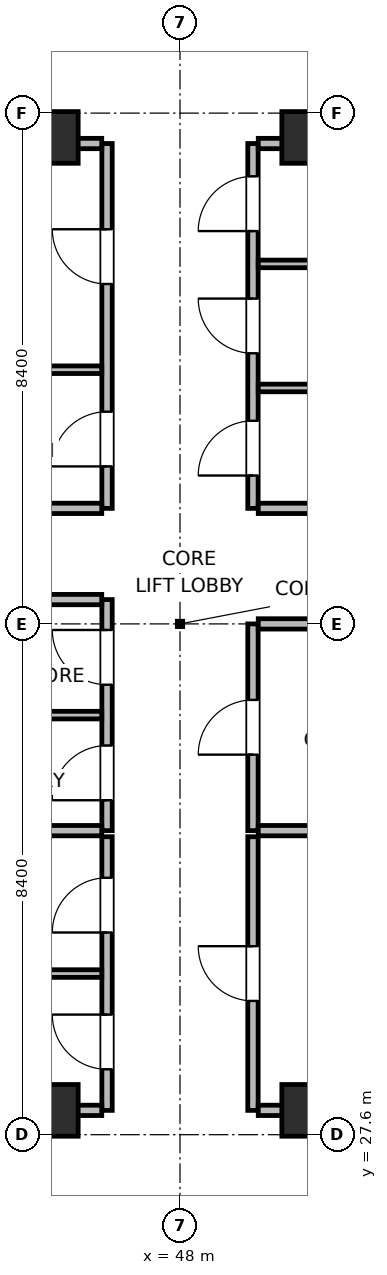
"""IFC4 building model, lengths in metres.
Left out: names, types, materials, properties, quantities, classifications, styles, units other than length and angle.
Written with IfcOpenShell. Run it as: python <this file> out.ifc"""

import sys

from ifc_helpers import new_model, si_unit, direction, frame, frame_2d, origin, origin_2d, place, context, subcontext, project, spatial, rectangle, extrude, element, fill, save


model = new_model("IFC4")
c1 = context("Model", 3, precision=1e-05, world=origin(), true_north=direction((0.0, 1.0)))
c2 = subcontext(c1, "Body", "Model", "MODEL_VIEW")
j1 = project(units=[si_unit("LENGTHUNIT", "METRE"), si_unit("PLANEANGLEUNIT", "RADIAN")], contexts=[c1])
p1 = place(None, origin())
s1 = spatial("IfcSite", under=j1, at=p1, CompositionType="ELEMENT")
p2 = place(p1, origin())
s2 = spatial("IfcBuilding", under=s1, at=p2, CompositionType="ELEMENT")
p3 = place(p2, frame((0.0, 0.0, 247.2)))
s3 = spatial("IfcBuildingStorey", under=s2, at=p3, CompositionType="ELEMENT", Elevation=247.2)
for number, where, z_axis, x_axis in (
    (1, (45.9, 28.0, 0.0), (0.0, 0.0, 1.0), (1.0, 0.0, 0.0)),
    (2, (50.1, 28.0, 0.0), (0.0, 0.0, 1.0), (1.0, 0.0, 0.0)),
    (3, (45.9, 44.0, 0.0), (0.0, 0.0, 1.0), (1.0, 0.0, 0.0)),
    (4, (50.1, 44.0, 0.0), (0.0, 0.0, 1.0), (1.0, 0.0, 0.0)),
):
    element("IfcColumn", number, at=place(p3, frame(where, z_axis=z_axis, x_axis=x_axis)), inside=s3, PredefinedType="COLUMN", context=c2, shape_type="SweptSolid", body=[
        extrude(rectangle(XDim=0.85, YDim=0.85, at=origin_2d()), origin(), (0.0, 0.0, 1.0), 3.9),
    ])
p4 = place(p3, frame((46.8, 32.6, 0.0), z_axis=(0.0, 0.0, 1.0), x_axis=(0.0, 1.0, 0.0)))
e5 = element("IfcWall", 5, at=p4, inside=s3, PredefinedType="PARTITIONING", context=c2, shape_type="SweptSolid", body=[
    extrude(rectangle(XDim=3.8, YDim=0.17, at=frame_2d((1.9, 0.0))), origin(), (0.0, 0.0, 1.0), 3.68),
])
p5 = place(p4, frame((0.5, 0.0, 0.0)))
e6 = element("IfcOpeningElement", 6, at=p5, cuts=e5, PredefinedType="OPENING", context=c2, shape_type="SweptSolid", body=[
    extrude(rectangle(XDim=0.9, YDim=2.02, at=frame_2d((0.45, 1.01))), frame((0.0, 0.095, 0.0), z_axis=(0.0, -1.0, 0.0), x_axis=(1.0, 0.0, 0.0)), (0.0, 0.0, 1.0), 0.19),
])
p6 = place(p4, frame((2.4, 0.0, 0.0)))
e7 = element("IfcOpeningElement", 7, at=p6, cuts=e5, PredefinedType="OPENING", context=c2, shape_type="SweptSolid", body=[
    extrude(rectangle(XDim=0.9, YDim=2.02, at=frame_2d((0.45, 1.01))), frame((0.0, 0.095, 0.0), z_axis=(0.0, -1.0, 0.0), x_axis=(1.0, 0.0, 0.0)), (0.0, 0.0, 1.0), 0.19),
])
for number, where, z_axis, x_axis in (
    (8, (43.8, 32.6, 0.0), (0.0, 0.0, 1.0), (1.0, 0.0, 0.0)),
    (9, (43.8, 36.4, 0.0), (0.0, 0.0, 1.0), (1.0, 0.0, 0.0)),
):
    element("IfcWall", number, at=place(p3, frame(where, z_axis=z_axis, x_axis=x_axis)), inside=s3, PredefinedType="PARTITIONING", context=c2, shape_type="SweptSolid", body=[
        extrude(rectangle(XDim=2.913, YDim=0.17, at=frame_2d((1.457, 0.0))), origin(), (0.0, 0.0, 1.0), 3.68),
    ])
p7 = place(p3, frame((43.8, 34.5, 0.0), z_axis=(0.0, 0.0, 1.0), x_axis=(1.0, 0.0, 0.0)))
e10 = element("IfcWall", 10, at=p7, inside=s3, PredefinedType="PARTITIONING", context=c2, shape_type="SweptSolid", body=[
    extrude(rectangle(XDim=2.913, YDim=0.125, at=frame_2d((1.457, 0.0))), origin(), (0.0, 0.0, 1.0), 3.68),
])
p8 = place(p3, frame((49.2, 32.6, 0.0), z_axis=(0.0, 0.0, 1.0), x_axis=(0.0, 1.0, 0.0)))
e11 = element("IfcWall", 11, at=p8, inside=s3, PredefinedType="PARTITIONING", context=c2, shape_type="SweptSolid", body=[
    extrude(rectangle(XDim=3.4, YDim=0.17, at=frame_2d((1.7, 0.0))), origin(), (0.0, 0.0, 1.0), 3.68),
])
p9 = place(p8, frame((1.25, 0.0, 0.0)))
e12 = element("IfcOpeningElement", 12, at=p9, cuts=e11, PredefinedType="OPENING", context=c2, shape_type="SweptSolid", body=[
    extrude(rectangle(XDim=0.9, YDim=2.02, at=frame_2d((0.45, 1.01))), frame((0.0, 0.095, 0.0), z_axis=(0.0, -1.0, 0.0), x_axis=(1.0, 0.0, 0.0)), (0.0, 0.0, 1.0), 0.19),
])
for number, where, z_axis, x_axis in (
    (13, (49.287, 32.6, 0.0), (0.0, 0.0, 1.0), (1.0, 0.0, 0.0)),
    (14, (49.287, 36.0, 0.0), (0.0, 0.0, 1.0), (1.0, 0.0, 0.0)),
):
    element("IfcWall", number, at=place(p3, frame(where, z_axis=z_axis, x_axis=x_axis)), inside=s3, PredefinedType="PARTITIONING", context=c2, shape_type="SweptSolid", body=[
        extrude(rectangle(XDim=2.913, YDim=0.17, at=frame_2d((1.457, 0.0))), origin(), (0.0, 0.0, 1.0), 3.68),
    ])
p10 = place(p3, frame((46.8, 28.0, 0.0), z_axis=(0.0, 0.0, 1.0), x_axis=(0.0, 1.0, 0.0)))
e15 = element("IfcWall", 15, at=p10, inside=s3, PredefinedType="PARTITIONING", context=c2, shape_type="SweptSolid", body=[
    extrude(rectangle(XDim=4.5, YDim=0.17, at=frame_2d((2.25, 0.0))), origin(), (0.0, 0.0, 1.0), 3.68),
])
p11 = place(p10, frame((0.675, 0.0, 0.0)))
e16 = element("IfcOpeningElement", 16, at=p11, cuts=e15, PredefinedType="OPENING", context=c2, shape_type="SweptSolid", body=[
    extrude(rectangle(XDim=0.9, YDim=2.02, at=frame_2d((0.45, 1.01))), frame((0.0, 0.095, 0.0), z_axis=(0.0, -1.0, 0.0), x_axis=(1.0, 0.0, 0.0)), (0.0, 0.0, 1.0), 0.19),
])
p12 = place(p10, frame((2.925, 0.0, 0.0)))
e17 = element("IfcOpeningElement", 17, at=p12, cuts=e15, PredefinedType="OPENING", context=c2, shape_type="SweptSolid", body=[
    extrude(rectangle(XDim=0.9, YDim=2.02, at=frame_2d((0.45, 1.01))), frame((0.0, 0.095, 0.0), z_axis=(0.0, -1.0, 0.0), x_axis=(1.0, 0.0, 0.0)), (0.0, 0.0, 1.0), 0.19),
])
p13 = place(p3, frame((42.5, 28.0, 0.0), z_axis=(0.0, 0.0, 1.0), x_axis=(1.0, 0.0, 0.0)))
e18 = element("IfcWall", 18, at=p13, inside=s3, PredefinedType="PARTITIONING", context=c2, shape_type="SweptSolid", body=[
    extrude(rectangle(XDim=4.213, YDim=0.17, at=frame_2d((2.106, 0.0))), origin(), (0.0, 0.0, 1.0), 2.765),
])
p14 = place(p3, frame((42.5, 30.25, 0.0), z_axis=(0.0, 0.0, 1.0), x_axis=(1.0, 0.0, 0.0)))
e19 = element("IfcWall", 19, at=p14, inside=s3, PredefinedType="PARTITIONING", context=c2, shape_type="SweptSolid", body=[
    extrude(rectangle(XDim=4.213, YDim=0.125, at=frame_2d((2.106, 0.0))), origin(), (0.0, 0.0, 1.0), 3.68),
])
p15 = place(p3, frame((49.2, 28.0, 0.0), z_axis=(0.0, 0.0, 1.0), x_axis=(0.0, 1.0, 0.0)))
e20 = element("IfcWall", 20, at=p15, inside=s3, PredefinedType="PARTITIONING", context=c2, shape_type="SweptSolid", body=[
    extrude(rectangle(XDim=4.5, YDim=0.17, at=frame_2d((2.25, 0.0))), origin(), (0.0, 0.0, 1.0), 3.68),
])
p16 = place(p15, frame((1.8, 0.0, 0.0)))
e21 = element("IfcOpeningElement", 21, at=p16, cuts=e20, PredefinedType="OPENING", context=c2, shape_type="SweptSolid", body=[
    extrude(rectangle(XDim=0.9, YDim=2.02, at=frame_2d((0.45, 1.01))), frame((0.0, 0.095, 0.0), z_axis=(0.0, -1.0, 0.0), x_axis=(1.0, 0.0, 0.0)), (0.0, 0.0, 1.0), 0.19),
])
p17 = place(p3, frame((49.287, 28.0, 0.0), z_axis=(0.0, 0.0, 1.0), x_axis=(1.0, 0.0, 0.0)))
e22 = element("IfcWall", 22, at=p17, inside=s3, PredefinedType="PARTITIONING", context=c2, shape_type="SweptSolid", body=[
    extrude(rectangle(XDim=4.213, YDim=0.17, at=frame_2d((2.106, 0.0))), origin(), (0.0, 0.0, 1.0), 2.765),
])
p18 = place(p3, frame((46.8, 37.9, 0.0), z_axis=(0.0, 0.0, 1.0), x_axis=(0.0, 1.0, 0.0)))
e23 = element("IfcWall", 23, at=p18, inside=s3, PredefinedType="PARTITIONING", context=c2, shape_type="SweptSolid", body=[
    extrude(rectangle(XDim=6.0, YDim=0.17, at=frame_2d((3.0, 0.0))), origin(), (0.0, 0.0, 1.0), 3.68),
])
p19 = place(p18, frame((0.69, 0.0, 0.0)))
e24 = element("IfcOpeningElement", 24, at=p19, cuts=e23, PredefinedType="OPENING", context=c2, shape_type="SweptSolid", body=[
    extrude(rectangle(XDim=0.9, YDim=2.02, at=frame_2d((0.45, 1.01))), frame((0.0, 0.095, 0.0), z_axis=(0.0, -1.0, 0.0), x_axis=(1.0, 0.0, 0.0)), (0.0, 0.0, 1.0), 0.19),
])
p20 = place(p18, frame((3.69, 0.0, 0.0)))
e25 = element("IfcOpeningElement", 25, at=p20, cuts=e23, PredefinedType="OPENING", context=c2, shape_type="SweptSolid", body=[
    extrude(rectangle(XDim=0.9, YDim=2.02, at=frame_2d((0.45, 1.01))), frame((0.0, 0.095, 0.0), z_axis=(0.0, -1.0, 0.0), x_axis=(1.0, 0.0, 0.0)), (0.0, 0.0, 1.0), 0.19),
])
p21 = place(p3, frame((42.5, 37.9, 0.0), z_axis=(0.0, 0.0, 1.0), x_axis=(1.0, 0.0, 0.0)))
e26 = element("IfcWall", 26, at=p21, inside=s3, PredefinedType="PARTITIONING", context=c2, shape_type="SweptSolid", body=[
    extrude(rectangle(XDim=4.213, YDim=0.17, at=frame_2d((2.106, 0.0))), origin(), (0.0, 0.0, 1.0), 3.68),
])
p22 = place(p3, frame((42.5, 43.9, 0.0), z_axis=(0.0, 0.0, 1.0), x_axis=(1.0, 0.0, 0.0)))
e27 = element("IfcWall", 27, at=p22, inside=s3, PredefinedType="PARTITIONING", context=c2, shape_type="SweptSolid", body=[
    extrude(rectangle(XDim=4.213, YDim=0.17, at=frame_2d((2.106, 0.0))), origin(), (0.0, 0.0, 1.0), 2.765),
])
p23 = place(p3, frame((42.5, 40.18, 0.0), z_axis=(0.0, 0.0, 1.0), x_axis=(1.0, 0.0, 0.0)))
e28 = element("IfcWall", 28, at=p23, inside=s3, PredefinedType="PARTITIONING", context=c2, shape_type="SweptSolid", body=[
    extrude(rectangle(XDim=4.213, YDim=0.125, at=frame_2d((2.106, 0.0))), origin(), (0.0, 0.0, 1.0), 3.68),
])
p24 = place(p3, frame((49.2, 37.9, 0.0), z_axis=(0.0, 0.0, 1.0), x_axis=(0.0, 1.0, 0.0)))
e29 = element("IfcWall", 29, at=p24, inside=s3, PredefinedType="PARTITIONING", context=c2, shape_type="SweptSolid", body=[
    extrude(rectangle(XDim=6.0, YDim=0.17, at=frame_2d((3.0, 0.0))), origin(), (0.0, 0.0, 1.0), 3.68),
])
p25 = place(p24, frame((0.54, 0.0, 0.0)))
e30 = element("IfcOpeningElement", 30, at=p25, cuts=e29, PredefinedType="OPENING", context=c2, shape_type="SweptSolid", body=[
    extrude(rectangle(XDim=0.9, YDim=2.02, at=frame_2d((0.45, 1.01))), frame((0.0, 0.095, 0.0), z_axis=(0.0, -1.0, 0.0), x_axis=(1.0, 0.0, 0.0)), (0.0, 0.0, 1.0), 0.19),
])
p26 = place(p24, frame((2.55, 0.0, 0.0)))
e31 = element("IfcOpeningElement", 31, at=p26, cuts=e29, PredefinedType="OPENING", context=c2, shape_type="SweptSolid", body=[
    extrude(rectangle(XDim=0.9, YDim=2.02, at=frame_2d((0.45, 1.01))), frame((0.0, 0.095, 0.0), z_axis=(0.0, -1.0, 0.0), x_axis=(1.0, 0.0, 0.0)), (0.0, 0.0, 1.0), 0.19),
])
p27 = place(p24, frame((4.56, 0.0, 0.0)))
e32 = element("IfcOpeningElement", 32, at=p27, cuts=e29, PredefinedType="OPENING", context=c2, shape_type="SweptSolid", body=[
    extrude(rectangle(XDim=0.9, YDim=2.02, at=frame_2d((0.45, 1.01))), frame((0.0, 0.095, 0.0), z_axis=(0.0, -1.0, 0.0), x_axis=(1.0, 0.0, 0.0)), (0.0, 0.0, 1.0), 0.19),
])
p28 = place(p3, frame((49.287, 37.9, 0.0), z_axis=(0.0, 0.0, 1.0), x_axis=(1.0, 0.0, 0.0)))
e33 = element("IfcWall", 33, at=p28, inside=s3, PredefinedType="PARTITIONING", context=c2, shape_type="SweptSolid", body=[
    extrude(rectangle(XDim=4.113, YDim=0.17, at=frame_2d((2.056, 0.0))), origin(), (0.0, 0.0, 1.0), 3.68),
])
p29 = place(p3, frame((49.287, 43.9, 0.0), z_axis=(0.0, 0.0, 1.0), x_axis=(1.0, 0.0, 0.0)))
e34 = element("IfcWall", 34, at=p29, inside=s3, PredefinedType="PARTITIONING", context=c2, shape_type="SweptSolid", body=[
    extrude(rectangle(XDim=4.113, YDim=0.17, at=frame_2d((2.056, 0.0))), origin(), (0.0, 0.0, 1.0), 2.765),
])
for number, where, z_axis, x_axis in (
    (35, (49.287, 39.88, 0.0), (0.0, 0.0, 1.0), (1.0, 0.0, 0.0)),
    (36, (49.287, 41.92, 0.0), (0.0, 0.0, 1.0), (1.0, 0.0, 0.0)),
):
    element("IfcWall", number, at=place(p3, frame(where, z_axis=z_axis, x_axis=x_axis)), inside=s3, PredefinedType="PARTITIONING", context=c2, shape_type="SweptSolid", body=[
        extrude(rectangle(XDim=4.113, YDim=0.125, at=frame_2d((2.056, 0.0))), origin(), (0.0, 0.0, 1.0), 3.68),
    ])
p30 = place(p5, origin())
e37 = element("IfcDoor", 37, at=p30, inside=s3, OperationType="SINGLE_SWING_LEFT", PredefinedType="DOOR", context=c2, shape_type="SweptSolid", body=[
    extrude(rectangle(XDim=0.9, YDim=2.02, at=frame_2d((0.45, 1.01))), frame((0.0, 0.025, 0.0), z_axis=(0.0, -1.0, 0.0), x_axis=(1.0, 0.0, 0.0)), (0.0, 0.0, 1.0), 0.05),
])
fill(e6, e37)
p31 = place(p6, origin())
e38 = element("IfcDoor", 38, at=p31, inside=s3, OperationType="SINGLE_SWING_RIGHT", PredefinedType="DOOR", context=c2, shape_type="SweptSolid", body=[
    extrude(rectangle(XDim=0.9, YDim=2.02, at=frame_2d((0.45, 1.01))), frame((0.0, 0.025, 0.0), z_axis=(0.0, -1.0, 0.0), x_axis=(1.0, 0.0, 0.0)), (0.0, 0.0, 1.0), 0.05),
])
fill(e7, e38)
p32 = place(p9, origin())
e39 = element("IfcDoor", 39, at=p32, inside=s3, OperationType="SINGLE_SWING_LEFT", PredefinedType="DOOR", context=c2, shape_type="SweptSolid", body=[
    extrude(rectangle(XDim=0.9, YDim=2.02, at=frame_2d((0.45, 1.01))), frame((0.0, 0.025, 0.0), z_axis=(0.0, -1.0, 0.0), x_axis=(1.0, 0.0, 0.0)), (0.0, 0.0, 1.0), 0.05),
])
fill(e12, e39)
p33 = place(p11, origin())
e40 = element("IfcDoor", 40, at=p33, inside=s3, OperationType="SINGLE_SWING_RIGHT", PredefinedType="DOOR", context=c2, shape_type="SweptSolid", body=[
    extrude(rectangle(XDim=0.9, YDim=2.02, at=frame_2d((0.45, 1.01))), frame((0.0, 0.025, 0.0), z_axis=(0.0, -1.0, 0.0), x_axis=(1.0, 0.0, 0.0)), (0.0, 0.0, 1.0), 0.05),
])
fill(e16, e40)
p34 = place(p12, origin())
e41 = element("IfcDoor", 41, at=p34, inside=s3, OperationType="SINGLE_SWING_LEFT", PredefinedType="DOOR", context=c2, shape_type="SweptSolid", body=[
    extrude(rectangle(XDim=0.9, YDim=2.02, at=frame_2d((0.45, 1.01))), frame((0.0, 0.025, 0.0), z_axis=(0.0, -1.0, 0.0), x_axis=(1.0, 0.0, 0.0)), (0.0, 0.0, 1.0), 0.05),
])
fill(e17, e41)
p35 = place(p16, origin())
e42 = element("IfcDoor", 42, at=p35, inside=s3, OperationType="SINGLE_SWING_RIGHT", PredefinedType="DOOR", context=c2, shape_type="SweptSolid", body=[
    extrude(rectangle(XDim=0.9, YDim=2.02, at=frame_2d((0.45, 1.01))), frame((0.0, 0.025, 0.0), z_axis=(0.0, -1.0, 0.0), x_axis=(1.0, 0.0, 0.0)), (0.0, 0.0, 1.0), 0.05),
])
fill(e21, e42)
p36 = place(p19, origin())
e43 = element("IfcDoor", 43, at=p36, inside=s3, OperationType="SINGLE_SWING_LEFT", PredefinedType="DOOR", context=c2, shape_type="SweptSolid", body=[
    extrude(rectangle(XDim=0.9, YDim=2.02, at=frame_2d((0.45, 1.01))), frame((0.0, 0.025, 0.0), z_axis=(0.0, -1.0, 0.0), x_axis=(1.0, 0.0, 0.0)), (0.0, 0.0, 1.0), 0.05),
])
fill(e24, e43)
p37 = place(p20, origin())
e44 = element("IfcDoor", 44, at=p37, inside=s3, OperationType="SINGLE_SWING_RIGHT", PredefinedType="DOOR", context=c2, shape_type="SweptSolid", body=[
    extrude(rectangle(XDim=0.9, YDim=2.02, at=frame_2d((0.45, 1.01))), frame((0.0, 0.025, 0.0), z_axis=(0.0, -1.0, 0.0), x_axis=(1.0, 0.0, 0.0)), (0.0, 0.0, 1.0), 0.05),
])
fill(e25, e44)
p38 = place(p25, origin())
e45 = element("IfcDoor", 45, at=p38, inside=s3, OperationType="SINGLE_SWING_LEFT", PredefinedType="DOOR", context=c2, shape_type="SweptSolid", body=[
    extrude(rectangle(XDim=0.9, YDim=2.02, at=frame_2d((0.45, 1.01))), frame((0.0, 0.025, 0.0), z_axis=(0.0, -1.0, 0.0), x_axis=(1.0, 0.0, 0.0)), (0.0, 0.0, 1.0), 0.05),
])
fill(e30, e45)
p39 = place(p26, origin())
e46 = element("IfcDoor", 46, at=p39, inside=s3, OperationType="SINGLE_SWING_RIGHT", PredefinedType="DOOR", context=c2, shape_type="SweptSolid", body=[
    extrude(rectangle(XDim=0.9, YDim=2.02, at=frame_2d((0.45, 1.01))), frame((0.0, 0.025, 0.0), z_axis=(0.0, -1.0, 0.0), x_axis=(1.0, 0.0, 0.0)), (0.0, 0.0, 1.0), 0.05),
])
fill(e31, e46)
p40 = place(p27, origin())
e47 = element("IfcDoor", 47, at=p40, inside=s3, OperationType="SINGLE_SWING_LEFT", PredefinedType="DOOR", context=c2, shape_type="SweptSolid", body=[
    extrude(rectangle(XDim=0.9, YDim=2.02, at=frame_2d((0.45, 1.01))), frame((0.0, 0.025, 0.0), z_axis=(0.0, -1.0, 0.0), x_axis=(1.0, 0.0, 0.0)), (0.0, 0.0, 1.0), 0.05),
])
fill(e32, e47)
save(model, sys.argv[1])
